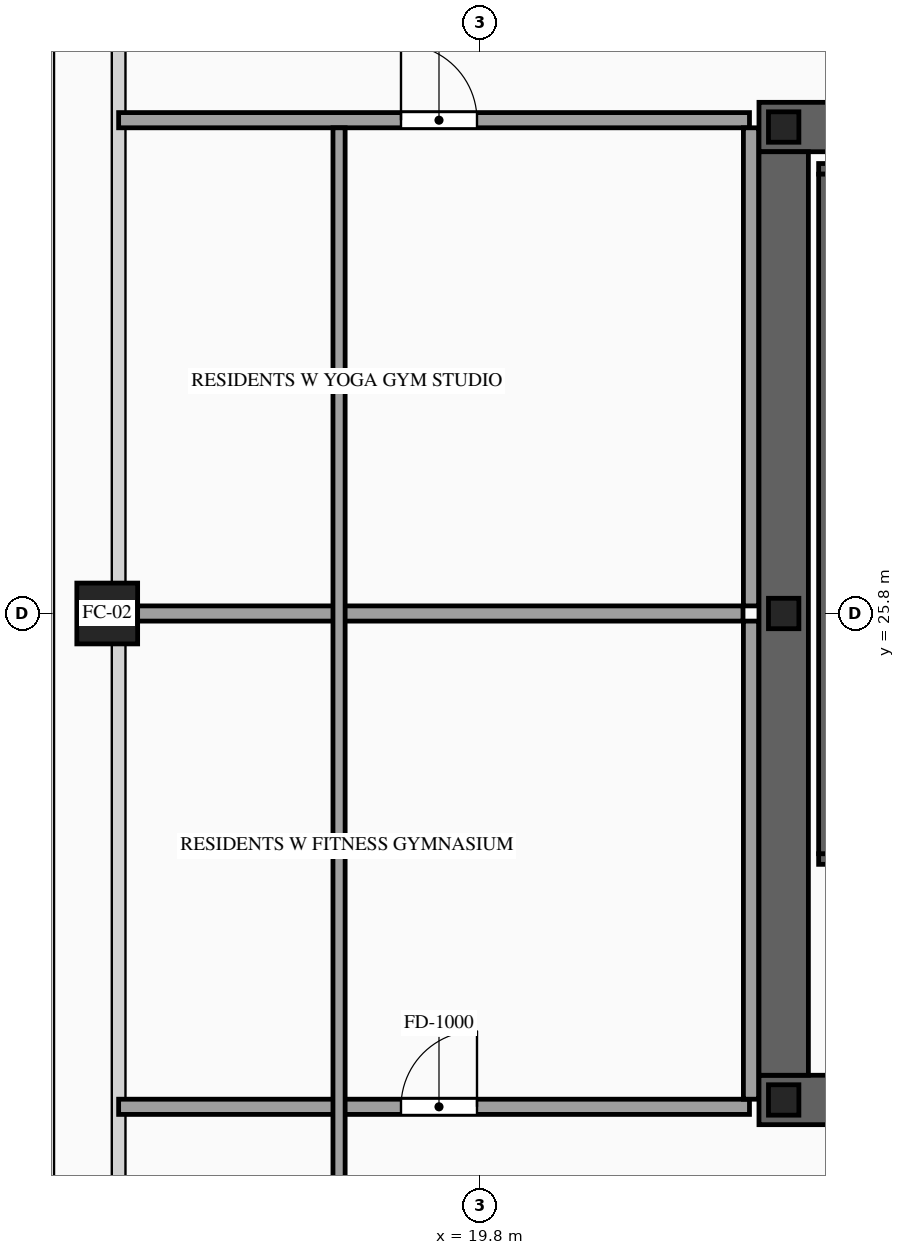
"""IFC4 building model, lengths in metres.
Left out: names, types, materials, properties, quantities, classifications, styles, units other than length and angle.
Written with IfcOpenShell. Run it as: python <this file> out.ifc"""

import sys

from ifc_helpers import new_model, si_unit, direction, frame, frame_2d, origin, origin_2d, place, context, subcontext, project, spatial, rectangle, hollow_rectangle, i_section, extrude, source, transform, mapped, element, fill, save


model = new_model("IFC4")
c1 = context("Model", 3, precision=1e-05, world=origin(), true_north=direction((0.0, 1.0)))
c2 = subcontext(c1, "Body", "Model", "MODEL_VIEW")
j1 = project(units=[si_unit("LENGTHUNIT", "METRE"), si_unit("PLANEANGLEUNIT", "RADIAN")], contexts=[c1])
p1 = place(None, origin())
s1 = spatial("IfcSite", under=j1, at=p1, CompositionType="ELEMENT")
p2 = place(p1, origin())
s2 = spatial("IfcBuilding", under=s1, at=p2, CompositionType="ELEMENT")
p3 = place(p2, frame((0.0, 0.0, 212.5)))
s3 = spatial("IfcBuildingStorey", under=s2, at=p3, CompositionType="ELEMENT", Elevation=212.5)
p4 = place(p3, frame((23.475, 19.4, 0.0), z_axis=(0.0, 0.0, 1.0), x_axis=(1.0, 0.0, 0.0)))
e1 = element("IfcWall", 1, at=p4, inside=s3, PredefinedType="SHEAR", context=c2, shape_type="SweptSolid", body=[
    extrude(rectangle(XDim=27.05, YDim=0.65, at=frame_2d((13.525, 0.0))), origin(), (0.0, 0.0, 1.0), 3.5),
])
p5 = place(p4, frame((1.975, 0.0, 0.0)))
e2 = element("IfcOpeningElement", 2, at=p5, cuts=e1, PredefinedType="OPENING", context=c2, shape_type="SweptSolid", body=[
    extrude(rectangle(XDim=1.1, YDim=2.2, at=frame_2d((0.55, 1.1))), frame((0.0, 0.34, 0.0), z_axis=(0.0, -1.0, 0.0), x_axis=(1.0, 0.0, 0.0)), (0.0, 0.0, 1.0), 0.68),
])
p6 = place(p4, frame((9.875, 0.0, 0.0)))
e3 = element("IfcOpeningElement", 3, at=p6, cuts=e1, PredefinedType="OPENING", context=c2, shape_type="SweptSolid", body=[
    extrude(rectangle(XDim=1.1, YDim=2.2, at=frame_2d((0.55, 1.1))), frame((0.0, 0.34, 0.0), z_axis=(0.0, -1.0, 0.0), x_axis=(1.0, 0.0, 0.0)), (0.0, 0.0, 1.0), 0.68),
])
p7 = place(p4, frame((23.075, 0.0, 0.0)))
e4 = element("IfcOpeningElement", 4, at=p7, cuts=e1, PredefinedType="OPENING", context=c2, shape_type="SweptSolid", body=[
    extrude(rectangle(XDim=1.1, YDim=2.2, at=frame_2d((0.55, 1.1))), frame((0.0, 0.34, 0.0), z_axis=(0.0, -1.0, 0.0), x_axis=(1.0, 0.0, 0.0)), (0.0, 0.0, 1.0), 0.68),
])
p8 = place(p4, frame((19.695, 0.0, 0.0)))
e5 = element("IfcOpeningElement", 5, at=p8, cuts=e1, PredefinedType="OPENING", context=c2, shape_type="SweptSolid", body=[
    extrude(rectangle(XDim=0.9, YDim=2.15, at=frame_2d((0.45, 1.075))), frame((0.0, 0.34, 0.0), z_axis=(0.0, -1.0, 0.0), x_axis=(1.0, 0.0, 0.0)), (0.0, 0.0, 1.0), 0.68),
])
p9 = place(p4, frame((18.255, 0.0, 0.0)))
e6 = element("IfcOpeningElement", 6, at=p9, cuts=e1, PredefinedType="OPENING", context=c2, shape_type="SweptSolid", body=[
    extrude(rectangle(XDim=0.9, YDim=2.15, at=frame_2d((0.45, 1.075))), frame((0.0, 0.34, 0.0), z_axis=(0.0, -1.0, 0.0), x_axis=(1.0, 0.0, 0.0)), (0.0, 0.0, 1.0), 0.68),
])
p10 = place(p3, frame((23.475, 32.2, 0.0), z_axis=(0.0, 0.0, 1.0), x_axis=(1.0, 0.0, 0.0)))
e7 = element("IfcWall", 7, at=p10, inside=s3, PredefinedType="SHEAR", context=c2, shape_type="SweptSolid", body=[
    extrude(rectangle(XDim=27.05, YDim=0.65, at=frame_2d((13.525, 0.0))), origin(), (0.0, 0.0, 1.0), 3.5),
])
p11 = place(p10, frame((4.595, 0.0, 0.0)))
e8 = element("IfcOpeningElement", 8, at=p11, cuts=e7, PredefinedType="OPENING", context=c2, shape_type="SweptSolid", body=[
    extrude(rectangle(XDim=0.9, YDim=2.15, at=frame_2d((0.45, 1.075))), frame((0.0, 0.34, 0.0), z_axis=(0.0, -1.0, 0.0), x_axis=(1.0, 0.0, 0.0)), (0.0, 0.0, 1.0), 0.68),
])
p12 = place(p10, frame((9.875, 0.0, 0.0)))
e9 = element("IfcOpeningElement", 9, at=p12, cuts=e7, PredefinedType="OPENING", context=c2, shape_type="SweptSolid", body=[
    extrude(rectangle(XDim=1.1, YDim=2.2, at=frame_2d((0.55, 1.1))), frame((0.0, 0.34, 0.0), z_axis=(0.0, -1.0, 0.0), x_axis=(1.0, 0.0, 0.0)), (0.0, 0.0, 1.0), 0.68),
])
p13 = place(p10, frame((15.725, 0.0, 0.0)))
e10 = element("IfcOpeningElement", 10, at=p13, cuts=e7, PredefinedType="OPENING", context=c2, shape_type="SweptSolid", body=[
    extrude(rectangle(XDim=1.1, YDim=2.2, at=frame_2d((0.55, 1.1))), frame((0.0, 0.34, 0.0), z_axis=(0.0, -1.0, 0.0), x_axis=(1.0, 0.0, 0.0)), (0.0, 0.0, 1.0), 0.68),
])
p14 = place(p10, frame((18.925, 0.0, 0.0)))
e11 = element("IfcOpeningElement", 11, at=p14, cuts=e7, PredefinedType="OPENING", context=c2, shape_type="SweptSolid", body=[
    extrude(rectangle(XDim=0.9, YDim=2.15, at=frame_2d((0.45, 1.075))), frame((0.0, 0.34, 0.0), z_axis=(0.0, -1.0, 0.0), x_axis=(1.0, 0.0, 0.0)), (0.0, 0.0, 1.0), 0.68),
])
m1 = source(origin(), c2, "Body", "SweptSolid", [
    extrude(rectangle(XDim=12.15, YDim=0.65, at=frame_2d((6.075, 0.0))), origin(), (0.0, 0.0, 1.0), 3.5),
])
p15 = place(p3, frame((23.8, 19.725, 0.0), z_axis=(0.0, 0.0, 1.0), x_axis=(0.0, 1.0, 0.0)))
e12 = element("IfcWall", 12, at=p15, inside=s3, PredefinedType="SHEAR", context=c2, shape_type="MappedRepresentation", body=[
    mapped(m1, transform((0.0, 0.0, 0.0), scale=1.0)),
])
m2 = source(origin(), c2, "Body", "SweptSolid", [
    extrude(i_section(OverallWidth=0.4, OverallDepth=0.4, WebThickness=0.013, FlangeThickness=0.021, at=origin_2d()), origin(), (0.0, 0.0, 1.0), 3.5),
])
for number, where, z_axis, x_axis in (
    (13, (23.8, 19.4, 0.0), (0.0, 0.0, 1.0), (1.0, 0.0, 0.0)),
    (14, (23.8, 25.8, 0.0), (0.0, 0.0, 1.0), (1.0, 0.0, 0.0)),
    (15, (23.8, 32.2, 0.0), (0.0, 0.0, 1.0), (1.0, 0.0, 0.0)),
):
    element("IfcColumn", number, at=place(p3, frame(where, z_axis=z_axis, x_axis=x_axis)), inside=s3, PredefinedType="COLUMN", context=c2, shape_type="MappedRepresentation", body=[
        mapped(m2, transform((0.0, 0.0, 0.0), scale=1.0)),
    ])
m3 = source(origin(), c2, "Body", "SweptSolid", [
    extrude(hollow_rectangle(XDim=0.8, YDim=0.8, WallThickness=0.036, at=origin_2d()), origin(), (0.0, 0.0, 1.0), 3.5),
])
p16 = place(p3, frame((14.9, 25.8, 0.0), z_axis=(0.0, 0.0, 1.0), x_axis=(1.0, 0.0, 0.0)))
e16 = element("IfcColumn", 16, at=p16, inside=s3, PredefinedType="COLUMN", context=c2, shape_type="MappedRepresentation", body=[
    mapped(m3, transform((0.0, 0.0, 0.0), scale=1.0)),
])
p17 = place(p3, frame((24.26, 22.57, 0.0), z_axis=(0.0, 0.0, 1.0), x_axis=(1.0, 0.0, 0.0)))
e17 = element("IfcWall", 17, at=p17, inside=s3, PredefinedType="SOLIDWALL", context=c2, shape_type="SweptSolid", body=[
    extrude(rectangle(XDim=3.28, YDim=0.14, at=frame_2d((1.64, 0.0))), origin(), (0.0, 0.0, 1.0), 3.28),
])
p18 = place(p17, frame((1.09, 0.0, 0.0)))
e18 = element("IfcOpeningElement", 18, at=p18, cuts=e17, PredefinedType="OPENING", context=c2, shape_type="SweptSolid", body=[
    extrude(rectangle(XDim=1.1, YDim=2.2, at=frame_2d((0.55, 1.1))), frame((0.0, 0.085, 0.0), z_axis=(0.0, -1.0, 0.0), x_axis=(1.0, 0.0, 0.0)), (0.0, 0.0, 1.0), 0.17),
])
m4 = source(origin(), c2, "Body", "SweptSolid", [
    extrude(rectangle(XDim=3.28, YDim=0.14, at=frame_2d((1.64, 0.0))), origin(), (0.0, 0.0, 1.0), 3.28),
])
p19 = place(p3, frame((24.26, 31.65, 0.0), z_axis=(0.0, 0.0, 1.0), x_axis=(1.0, 0.0, 0.0)))
e19 = element("IfcWall", 19, at=p19, inside=s3, PredefinedType="SOLIDWALL", context=c2, shape_type="MappedRepresentation", body=[
    mapped(m4, transform((0.0, 0.0, 0.0), scale=1.0)),
])
m5 = source(origin(), c2, "Body", "SweptSolid", [
    extrude(rectangle(XDim=8.94, YDim=0.14, at=frame_2d((4.47, 0.0))), origin(), (0.0, 0.0, 1.0), 3.28),
])
p20 = place(p3, frame((24.33, 22.64, 0.0), z_axis=(0.0, 0.0, 1.0), x_axis=(0.0, 1.0, 0.0)))
e20 = element("IfcWall", 20, at=p20, inside=s3, PredefinedType="SOLIDWALL", context=c2, shape_type="MappedRepresentation", body=[
    mapped(m5, transform((0.0, 0.0, 0.0), scale=1.0)),
])
p21 = place(p3, frame((15.05, 19.31, 0.0), z_axis=(0.0, 0.0, 1.0), x_axis=(1.0, 0.0, 0.0)))
e21 = element("IfcWall", 21, at=p21, inside=s3, PredefinedType="PARTITIONING", context=c2, shape_type="SweptSolid", body=[
    extrude(rectangle(XDim=8.3, YDim=0.2, at=frame_2d((4.15, 0.0))), origin(), (0.0, 0.0, 1.0), 2.775),
])
p22 = place(p21, frame((3.715, 0.0, 0.0)))
e22 = element("IfcOpeningElement", 22, at=p22, cuts=e21, PredefinedType="OPENING", context=c2, shape_type="SweptSolid", body=[
    extrude(rectangle(XDim=1.0, YDim=2.2, at=frame_2d((0.5, 1.1))), frame((0.0, 0.115, 0.0), z_axis=(0.0, -1.0, 0.0), x_axis=(1.0, 0.0, 0.0)), (0.0, 0.0, 1.0), 0.23),
])
m6 = source(origin(), c2, "Body", "SweptSolid", [
    extrude(rectangle(XDim=8.215, YDim=0.2, at=frame_2d((4.107, 0.0))), origin(), (0.0, 0.0, 1.0), 2.687),
])
p23 = place(p3, frame((15.05, 25.8, 0.0), z_axis=(0.0, 0.0, 1.0), x_axis=(1.0, 0.0, 0.0)))
e23 = element("IfcWall", 23, at=p23, inside=s3, PredefinedType="PARTITIONING", context=c2, shape_type="MappedRepresentation", body=[
    mapped(m6, transform((0.0, 0.0, 0.0), scale=1.0)),
])
m7 = source(origin(), c2, "Body", "SweptSolid", [
    extrude(rectangle(XDim=6.29, YDim=0.2, at=frame_2d((3.145, 0.0))), origin(), (0.0, 0.0, 1.0), 3.28),
])
p24 = place(p3, frame((23.37, 19.41, 0.0), z_axis=(0.0, 0.0, 1.0), x_axis=(0.0, 1.0, 0.0)))
e24 = element("IfcWall", 24, at=p24, inside=s3, PredefinedType="PARTITIONING", context=c2, shape_type="MappedRepresentation", body=[
    mapped(m7, transform((0.0, 0.0, 0.0), scale=1.0)),
])
p25 = place(p3, frame((15.05, 32.29, 0.0), z_axis=(0.0, 0.0, 1.0), x_axis=(1.0, 0.0, 0.0)))
e25 = element("IfcWall", 25, at=p25, inside=s3, PredefinedType="PARTITIONING", context=c2, shape_type="SweptSolid", body=[
    extrude(rectangle(XDim=8.3, YDim=0.2, at=frame_2d((4.15, 0.0))), origin(), (0.0, 0.0, 1.0), 2.775),
])
p26 = place(p25, frame((3.715, 0.0, 0.0)))
e26 = element("IfcOpeningElement", 26, at=p26, cuts=e25, PredefinedType="OPENING", context=c2, shape_type="SweptSolid", body=[
    extrude(rectangle(XDim=1.0, YDim=2.2, at=frame_2d((0.5, 1.1))), frame((0.0, 0.115, 0.0), z_axis=(0.0, -1.0, 0.0), x_axis=(1.0, 0.0, 0.0)), (0.0, 0.0, 1.0), 0.23),
])
m8 = source(origin(), c2, "Body", "SweptSolid", [
    extrude(rectangle(XDim=28.19, YDim=0.16, at=frame_2d((14.095, 0.0))), origin(), (0.0, 0.0, 1.0), 3.28),
])
p27 = place(p3, frame((17.95, 4.0, 0.0), z_axis=(0.0, 0.0, 1.0), x_axis=(0.0, 1.0, 0.0)))
e27 = element("IfcWall", 27, at=p27, inside=s3, PredefinedType="PARTITIONING", context=c2, shape_type="MappedRepresentation", body=[
    mapped(m8, transform((0.0, 0.0, 0.0), scale=1.0)),
])
p28 = place(p3, frame((23.37, 25.9, 0.0), z_axis=(0.0, 0.0, 1.0), x_axis=(0.0, 1.0, 0.0)))
e28 = element("IfcWall", 28, at=p28, inside=s3, PredefinedType="PARTITIONING", context=c2, shape_type="MappedRepresentation", body=[
    mapped(m7, transform((0.0, 0.0, 0.0), scale=1.0)),
])
m9 = source(origin(), c2, "Body", "SweptSolid", [
    extrude(rectangle(XDim=1.0, YDim=2.2, at=frame_2d((0.5, 1.1))), frame((0.0, 0.025, 0.0), z_axis=(0.0, -1.0, 0.0), x_axis=(1.0, 0.0, 0.0)), (0.0, 0.0, 1.0), 0.05),
])
p29 = place(p22, origin())
e29 = element("IfcDoor", 29, at=p29, inside=s3, OperationType="SINGLE_SWING_RIGHT", PredefinedType="DOOR", context=c2, shape_type="MappedRepresentation", body=[
    mapped(m9, transform((0.0, 0.0, 0.0), scale=1.0)),
])
fill(e22, e29)
p30 = place(p26, origin())
e30 = element("IfcDoor", 30, at=p30, inside=s3, OperationType="SINGLE_SWING_LEFT", PredefinedType="DOOR", context=c2, shape_type="MappedRepresentation", body=[
    mapped(m9, transform((0.0, 0.0, 0.0), scale=1.0)),
])
fill(e26, e30)
save(model, sys.argv[1])
